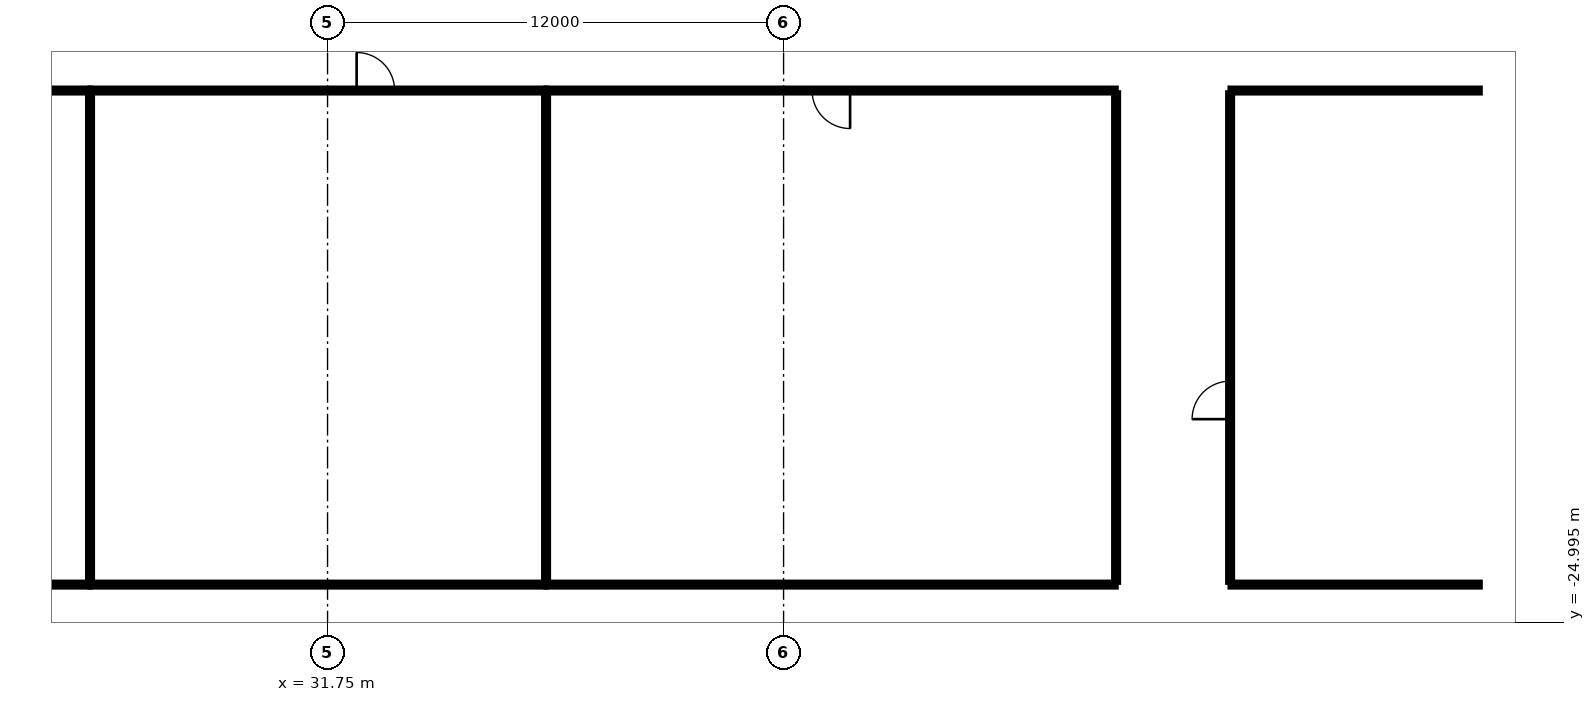
"""IFC4 building model, lengths in metres.
Left out: names, types, materials, properties, quantities, classifications, styles, units other than length and angle.
Written with IfcOpenShell. Run it as: python <this file> out.ifc"""

import sys

from ifc_helpers import new_model, si_unit, direction, frame, frame_2d, origin, origin_2d, place, context, subcontext, project, spatial, rectangle, hollow_rectangle, circle, extrude, element, fill, save


model = new_model("IFC4")
c1 = context("Model", 3, precision=1e-05, world=origin(), true_north=direction((0.0, 1.0)))
c2 = subcontext(c1, "Body", "Model", "MODEL_VIEW")
j1 = project(units=[si_unit("LENGTHUNIT", "METRE"), si_unit("PLANEANGLEUNIT", "RADIAN")], contexts=[c1])
p1 = place(None, origin())
s1 = spatial("IfcSite", under=j1, at=p1, CompositionType="ELEMENT")
p2 = place(p1, origin())
s2 = spatial("IfcBuilding", under=s1, at=p2, CompositionType="ELEMENT")
p3 = place(p2, frame((0.0, 0.0, 12.0)))
s3 = spatial("IfcBuildingStorey", under=s2, at=p3, CompositionType="ELEMENT", Elevation=12.0)
p4 = place(p3, frame((54.6, -12.6, 0.0), z_axis=(0.0, 0.0, 1.0), x_axis=(1.0, 0.0, 0.0)))
e1 = element("IfcColumn", 1, at=p4, inside=s3, PredefinedType="COLUMN", context=c2, shape_type="SweptSolid", body=[
    extrude(circle(Radius=0.6, at=origin_2d()), origin(), (0.0, 0.0, 1.0), 4.5),
])
p5 = place(p3, frame((59.4, -12.6, 0.0), z_axis=(0.0, 0.0, 1.0), x_axis=(1.0, 0.0, 0.0)))
e2 = element("IfcColumn", 2, at=p5, inside=s3, PredefinedType="COLUMN", context=c2, shape_type="SweptSolid", body=[
    extrude(circle(Radius=0.6, at=origin_2d()), origin(), (0.0, 0.0, 1.0), 4.2),
])
for number, where, z_axis, x_axis in (
    (3, (25.643, -22.79, 0.0), (0.0, 0.0, 1.0), (-0.259, -0.966, 0.0)),
    (4, (37.553, -21.658, 0.0), (0.0, 0.0, 1.0), (0.259, -0.966, 0.0)),
):
    element("IfcColumn", number, at=place(p3, frame(where, z_axis=z_axis, x_axis=x_axis)), inside=s3, PredefinedType="COLUMN", context=c2, shape_type="SweptSolid", body=[
        extrude(hollow_rectangle(XDim=1.5, YDim=1.5, WallThickness=0.07, at=origin_2d()), origin(), (0.0, 0.0, 1.0), 4.5),
    ])
p6 = place(p3, frame((16.5, -11.0, 0.0), z_axis=(0.0, 0.0, 1.0), x_axis=(1.0, 0.0, 0.0)))
e5 = element("IfcWall", 5, at=p6, inside=s3, PredefinedType="PARTITIONING", context=c2, shape_type="SweptSolid", body=[
    extrude(rectangle(XDim=9.0, YDim=0.125, at=frame_2d((4.5, 0.0))), origin(), (0.0, 0.0, 1.0), 3.496),
])
p7 = place(p6, frame((2.935, 0.0, 0.0)))
e6 = element("IfcOpeningElement", 6, at=p7, cuts=e5, PredefinedType="OPENING", context=c2, shape_type="SweptSolid", body=[
    extrude(rectangle(XDim=1.0, YDim=2.1, at=frame_2d((0.5, 1.05))), frame((0.0, 0.073, 0.0), z_axis=(0.0, -1.0, 0.0), x_axis=(1.0, 0.0, 0.0)), (0.0, 0.0, 1.0), 0.145),
])
p8 = place(p3, frame((25.5, -11.0, 0.0), z_axis=(0.0, 0.0, 1.0), x_axis=(1.0, 0.0, 0.0)))
e7 = element("IfcWall", 7, at=p8, inside=s3, PredefinedType="PARTITIONING", context=c2, shape_type="SweptSolid", body=[
    extrude(rectangle(XDim=12.0, YDim=0.125, at=frame_2d((6.0, 0.0))), origin(), (0.0, 0.0, 1.0), 3.418),
])
p9 = place(p8, frame((7.015, 0.0, 0.0)))
e8 = element("IfcOpeningElement", 8, at=p9, cuts=e7, PredefinedType="OPENING", context=c2, shape_type="SweptSolid", body=[
    extrude(rectangle(XDim=1.0, YDim=2.1, at=frame_2d((0.5, 1.05))), frame((0.0, 0.073, 0.0), z_axis=(0.0, -1.0, 0.0), x_axis=(1.0, 0.0, 0.0)), (0.0, 0.0, 1.0), 0.145),
])
p10 = place(p3, frame((37.5, -11.0, 0.0), z_axis=(0.0, 0.0, 1.0), x_axis=(1.0, 0.0, 0.0)))
e9 = element("IfcWall", 9, at=p10, inside=s3, PredefinedType="PARTITIONING", context=c2, shape_type="SweptSolid", body=[
    extrude(rectangle(XDim=15.0, YDim=0.125, at=frame_2d((7.5, 0.0))), origin(), (0.0, 0.0, 1.0), 3.496),
])
p11 = place(p10, frame((7.0, 0.0, 0.0)))
e10 = element("IfcOpeningElement", 10, at=p11, cuts=e9, PredefinedType="OPENING", context=c2, shape_type="SweptSolid", body=[
    extrude(rectangle(XDim=1.0, YDim=2.1, at=frame_2d((0.5, 1.05))), frame((0.0, 0.073, 0.0), z_axis=(0.0, -1.0, 0.0), x_axis=(1.0, 0.0, 0.0)), (0.0, 0.0, 1.0), 0.145),
])
p12 = place(p3, frame((55.5, -11.0, 0.0), z_axis=(0.0, 0.0, 1.0), x_axis=(1.0, 0.0, 0.0)))
e11 = element("IfcWall", 11, at=p12, inside=s3, PredefinedType="PARTITIONING", context=c2, shape_type="SweptSolid", body=[
    extrude(rectangle(XDim=6.58, YDim=0.125, at=frame_2d((3.29, 0.0))), origin(), (0.0, 0.0, 1.0), 2.68),
])
p13 = place(p3, frame((25.5, -24.0, 0.0), z_axis=(0.0, 0.0, 1.0), x_axis=(-1.0, 0.0, 0.0)))
e12 = element("IfcWall", 12, at=p13, inside=s3, PredefinedType="PARTITIONING", context=c2, shape_type="SweptSolid", body=[
    extrude(rectangle(XDim=9.0, YDim=0.125, at=frame_2d((4.5, 0.0))), origin(), (0.0, 0.0, 1.0), 4.2),
])
p14 = place(p3, frame((37.5, -24.0, 0.0), z_axis=(0.0, 0.0, 1.0), x_axis=(-1.0, 0.0, 0.0)))
e13 = element("IfcWall", 13, at=p14, inside=s3, PredefinedType="PARTITIONING", context=c2, shape_type="SweptSolid", body=[
    extrude(rectangle(XDim=12.0, YDim=0.125, at=frame_2d((6.0, 0.0))), origin(), (0.0, 0.0, 1.0), 2.68),
])
p15 = place(p3, frame((52.5, -24.0, 0.0), z_axis=(0.0, 0.0, 1.0), x_axis=(-1.0, 0.0, 0.0)))
e14 = element("IfcWall", 14, at=p15, inside=s3, PredefinedType="PARTITIONING", context=c2, shape_type="SweptSolid", body=[
    extrude(rectangle(XDim=15.0, YDim=0.125, at=frame_2d((7.5, 0.0))), origin(), (0.0, 0.0, 1.0), 4.2),
])
p16 = place(p3, frame((62.08, -24.0, 0.0), z_axis=(0.0, 0.0, 1.0), x_axis=(-1.0, 0.0, 0.0)))
e15 = element("IfcWall", 15, at=p16, inside=s3, PredefinedType="PARTITIONING", context=c2, shape_type="SweptSolid", body=[
    extrude(rectangle(XDim=6.58, YDim=0.125, at=frame_2d((3.29, 0.0))), origin(), (0.0, 0.0, 1.0), 2.68),
])
p17 = place(p3, frame((52.5, -11.062, 0.0), z_axis=(0.0, 0.0, 1.0), x_axis=(0.0, -1.0, 0.0)))
e16 = element("IfcWall", 16, at=p17, inside=s3, PredefinedType="PARTITIONING", context=c2, shape_type="SweptSolid", body=[
    extrude(rectangle(XDim=12.875, YDim=0.125, at=frame_2d((6.438, 0.0))), origin(), (0.0, 0.0, 1.0), 2.68),
])
p18 = place(p3, frame((55.5, -23.938, 0.0), z_axis=(0.0, 0.0, 1.0), x_axis=(0.0, 1.0, 0.0)))
e17 = element("IfcWall", 17, at=p18, inside=s3, PredefinedType="PARTITIONING", context=c2, shape_type="SweptSolid", body=[
    extrude(rectangle(XDim=12.875, YDim=0.125, at=frame_2d((6.438, 0.0))), origin(), (0.0, 0.0, 1.0), 2.68),
])
p19 = place(p18, frame((4.291, 0.0, 0.0)))
e18 = element("IfcOpeningElement", 18, at=p19, cuts=e17, PredefinedType="OPENING", context=c2, shape_type="SweptSolid", body=[
    extrude(rectangle(XDim=1.0, YDim=2.1, at=frame_2d((0.5, 1.05))), frame((0.0, 0.073, 0.0), z_axis=(0.0, -1.0, 0.0), x_axis=(1.0, 0.0, 0.0)), (0.0, 0.0, 1.0), 0.145),
])
for number, where, z_axis, x_axis in (
    (19, (25.5, -23.938, 0.0), (0.0, 0.0, 1.0), (0.0, 1.0, 0.0)),
    (20, (37.5, -23.938, 0.0), (0.0, 0.0, 1.0), (0.0, 1.0, 0.0)),
):
    element("IfcWall", number, at=place(p3, frame(where, z_axis=z_axis, x_axis=x_axis)), inside=s3, PredefinedType="PARTITIONING", context=c2, shape_type="SweptSolid", body=[
        extrude(rectangle(XDim=12.875, YDim=0.125, at=frame_2d((6.438, 0.0))), origin(), (0.0, 0.0, 1.0), 3.496),
    ])
p20 = place(p9, origin())
e21 = element("IfcDoor", 21, at=p20, inside=s3, OperationType="SINGLE_SWING_LEFT", PredefinedType="DOOR", context=c2, shape_type="SweptSolid", body=[
    extrude(rectangle(XDim=1.0, YDim=2.1, at=frame_2d((0.5, 1.05))), frame((0.0, 0.025, 0.0), z_axis=(0.0, -1.0, 0.0), x_axis=(1.0, 0.0, 0.0)), (0.0, 0.0, 1.0), 0.05),
])
fill(e8, e21)
p21 = place(p11, origin())
e22 = element("IfcDoor", 22, at=p21, inside=s3, OperationType="SINGLE_SWING_RIGHT", PredefinedType="DOOR", context=c2, shape_type="SweptSolid", body=[
    extrude(rectangle(XDim=1.0, YDim=2.1, at=frame_2d((0.5, 1.05))), frame((0.0, 0.025, 0.0), z_axis=(0.0, -1.0, 0.0), x_axis=(1.0, 0.0, 0.0)), (0.0, 0.0, 1.0), 0.05),
])
fill(e10, e22)
p22 = place(p19, origin())
e23 = element("IfcDoor", 23, at=p22, inside=s3, OperationType="SINGLE_SWING_LEFT", PredefinedType="DOOR", context=c2, shape_type="SweptSolid", body=[
    extrude(rectangle(XDim=1.0, YDim=2.1, at=frame_2d((0.5, 1.05))), frame((0.0, 0.025, 0.0), z_axis=(0.0, -1.0, 0.0), x_axis=(1.0, 0.0, 0.0)), (0.0, 0.0, 1.0), 0.05),
])
fill(e18, e23)
save(model, sys.argv[1])
